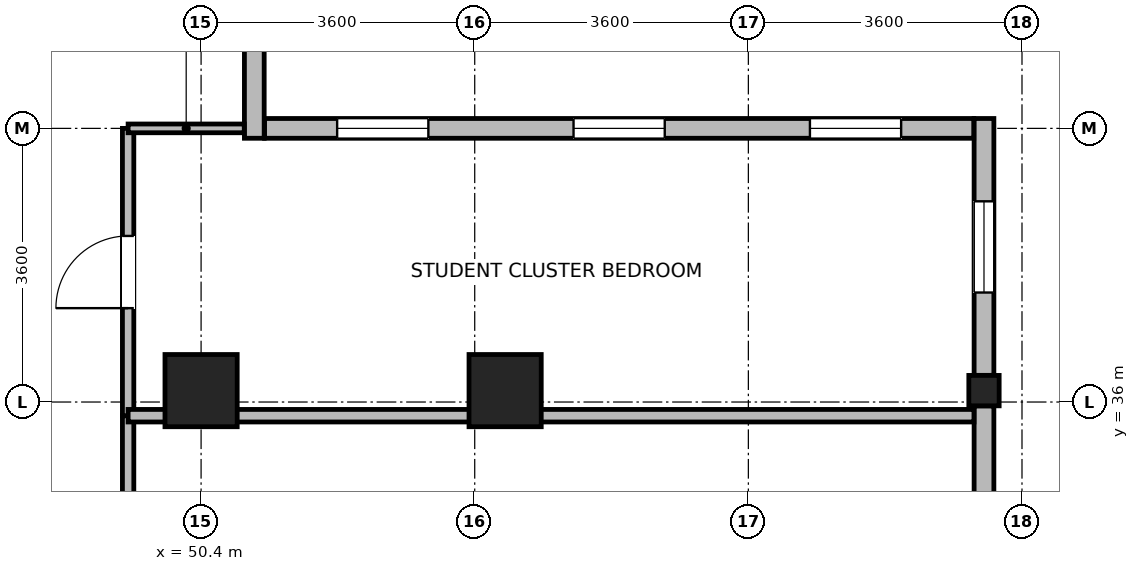
"""IFC4 building model, lengths in metres.
Left out: names, types, materials, properties, quantities, classifications, styles, units other than length and angle.
Written with IfcOpenShell. Run it as: python <this file> out.ifc"""

import sys

from ifc_helpers import new_model, si_unit, direction, frame, frame_2d, origin, origin_2d, place, context, subcontext, project, spatial, rectangle, i_section, extrude, source, transform, mapped, element, fill, save


model = new_model("IFC4")
c1 = context("Model", 3, precision=1e-05, world=origin(), true_north=direction((0.0, 1.0)))
c2 = subcontext(c1, "Body", "Model", "MODEL_VIEW")
j1 = project(units=[si_unit("LENGTHUNIT", "METRE"), si_unit("PLANEANGLEUNIT", "RADIAN")], contexts=[c1])
p1 = place(None, origin())
s1 = spatial("IfcSite", under=j1, at=p1, CompositionType="ELEMENT")
p2 = place(p1, origin())
s2 = spatial("IfcBuilding", under=s1, at=p2, CompositionType="ELEMENT")
p3 = place(p2, frame((0.0, 0.0, 242.5)))
s3 = spatial("IfcBuildingStorey", under=s2, at=p3, CompositionType="ELEMENT", Elevation=242.5)
m1 = source(origin(), c2, "Body", "SweptSolid", [
    extrude(rectangle(XDim=0.95, YDim=0.95, at=origin_2d()), origin(), (0.0, 0.0, 1.0), 3.7),
])
for number, where, z_axis, x_axis in (
    (1, (50.4, 36.15, 0.0), (0.0, 0.0, 1.0), (1.0, 0.0, 0.0)),
    (2, (54.4, 36.15, 0.0), (0.0, 0.0, 1.0), (1.0, 0.0, 0.0)),
):
    element("IfcColumn", number, at=place(p3, frame(where, z_axis=z_axis, x_axis=x_axis)), inside=s3, PredefinedType="COLUMN", context=c2, shape_type="MappedRepresentation", body=[
        mapped(m1, transform((0.0, 0.0, 0.0), x_axis=(1.0, 0.0, 0.0), y_axis=(0.0, 1.0, 0.0), z_axis=(0.0, 0.0, 1.0), scale=1.0)),
    ])
m2 = source(origin(), c2, "Body", "SweptSolid", [
    extrude(i_section(OverallWidth=0.399, OverallDepth=0.4, WebThickness=0.017, FlangeThickness=0.023, FilletRadius=0.015, at=origin_2d()), origin(), (0.0, 0.0, 1.0), 3.7),
])
p4 = place(p3, frame((60.7, 36.15, 0.0), z_axis=(0.0, 0.0, 1.0), x_axis=(1.0, 0.0, 0.0)))
e3 = element("IfcColumn", 3, at=p4, inside=s3, PredefinedType="COLUMN", context=c2, shape_type="MappedRepresentation", body=[
    mapped(m2, transform((0.0, 0.0, 0.0), x_axis=(1.0, 0.0, 0.0), y_axis=(0.0, 1.0, 0.0), z_axis=(0.0, 0.0, 1.0), scale=1.0)),
])
p5 = place(p3, frame((60.7, 35.949, 0.0), z_axis=(0.0, 0.0, 1.0), x_axis=(0.0, -1.0, 0.0)))
e4 = element("IfcWall", 4, at=p5, inside=s3, PredefinedType="STANDARD", context=c2, shape_type="SweptSolid", body=[
    extrude(rectangle(XDim=7.098, YDim=0.26, at=frame_2d((3.549, 0.0))), origin(), (0.0, 0.0, 1.0), 3.02),
])
p6 = place(p5, frame((1.175, 0.0, 0.85)))
e5 = element("IfcOpeningElement", 5, at=p6, cuts=e4, PredefinedType="OPENING", context=c2, shape_type="SweptSolid", body=[
    extrude(rectangle(XDim=1.2, YDim=1.75, at=frame_2d((0.6, 0.875))), frame((0.0, 0.14, 0.0), z_axis=(0.0, -1.0, 0.0), x_axis=(1.0, 0.0, 0.0)), (0.0, 0.0, 1.0), 0.28),
])
p7 = place(p5, frame((4.723, 0.0, 0.85)))
e6 = element("IfcOpeningElement", 6, at=p7, cuts=e4, PredefinedType="OPENING", context=c2, shape_type="SweptSolid", body=[
    extrude(rectangle(XDim=1.2, YDim=1.75, at=frame_2d((0.6, 0.875))), frame((0.0, 0.14, 0.0), z_axis=(0.0, -1.0, 0.0), x_axis=(1.0, 0.0, 0.0)), (0.0, 0.0, 1.0), 0.28),
])
p8 = place(p3, frame((60.7, 39.73, 0.0), z_axis=(0.0, 0.0, 1.0), x_axis=(0.0, -1.0, 0.0)))
e7 = element("IfcWall", 7, at=p8, inside=s3, PredefinedType="STANDARD", context=c2, shape_type="SweptSolid", body=[
    extrude(rectangle(XDim=3.379, YDim=0.26, at=frame_2d((1.689, 0.0))), origin(), (0.0, 0.0, 1.0), 3.42),
])
p9 = place(p8, frame((1.09, 0.0, 0.85)))
e8 = element("IfcOpeningElement", 8, at=p9, cuts=e7, PredefinedType="OPENING", context=c2, shape_type="SweptSolid", body=[
    extrude(rectangle(XDim=1.2, YDim=1.75, at=frame_2d((0.6, 0.875))), frame((0.0, 0.14, 0.0), z_axis=(0.0, -1.0, 0.0), x_axis=(1.0, 0.0, 0.0)), (0.0, 0.0, 1.0), 0.28),
])
p10 = place(p3, frame((51.235, 39.6, 0.0), z_axis=(0.0, 0.0, 1.0), x_axis=(1.0, 0.0, 0.0)))
e9 = element("IfcWall", 9, at=p10, inside=s3, PredefinedType="STANDARD", context=c2, shape_type="SweptSolid", body=[
    extrude(rectangle(XDim=9.33, YDim=0.26, at=frame_2d((4.665, 0.0))), origin(), (0.0, 0.0, 1.0), 3.42),
])
p11 = place(p10, frame((0.955, 0.0, 0.85)))
e10 = element("IfcOpeningElement", 10, at=p11, cuts=e9, PredefinedType="OPENING", context=c2, shape_type="SweptSolid", body=[
    extrude(rectangle(XDim=1.2, YDim=1.75, at=frame_2d((0.6, 0.875))), frame((0.0, 0.14, 0.0), z_axis=(0.0, -1.0, 0.0), x_axis=(1.0, 0.0, 0.0)), (0.0, 0.0, 1.0), 0.28),
])
p12 = place(p10, frame((4.065, 0.0, 0.85)))
e11 = element("IfcOpeningElement", 11, at=p12, cuts=e9, PredefinedType="OPENING", context=c2, shape_type="SweptSolid", body=[
    extrude(rectangle(XDim=1.2, YDim=1.75, at=frame_2d((0.6, 0.875))), frame((0.0, 0.14, 0.0), z_axis=(0.0, -1.0, 0.0), x_axis=(1.0, 0.0, 0.0)), (0.0, 0.0, 1.0), 0.28),
])
p13 = place(p10, frame((7.175, 0.0, 0.85)))
e12 = element("IfcOpeningElement", 12, at=p13, cuts=e9, PredefinedType="OPENING", context=c2, shape_type="SweptSolid", body=[
    extrude(rectangle(XDim=1.2, YDim=1.75, at=frame_2d((0.6, 0.875))), frame((0.0, 0.14, 0.0), z_axis=(0.0, -1.0, 0.0), x_axis=(1.0, 0.0, 0.0)), (0.0, 0.0, 1.0), 0.28),
])
p14 = place(p3, frame((51.1, 43.33, 0.0), z_axis=(0.0, 0.0, 1.0), x_axis=(0.0, -1.0, 0.0)))
e13 = element("IfcWall", 13, at=p14, inside=s3, PredefinedType="STANDARD", context=c2, shape_type="SweptSolid", body=[
    extrude(rectangle(XDim=3.86, YDim=0.26, at=frame_2d((1.93, 0.0))), origin(), (0.0, 0.0, 1.0), 3.42),
])
p15 = place(p14, frame((1.33, 0.0, 0.85)))
e14 = element("IfcOpeningElement", 14, at=p15, cuts=e13, PredefinedType="OPENING", context=c2, shape_type="SweptSolid", body=[
    extrude(rectangle(XDim=1.2, YDim=1.75, at=frame_2d((0.6, 0.875))), frame((0.0, 0.14, 0.0), z_axis=(0.0, -1.0, 0.0), x_axis=(1.0, 0.0, 0.0)), (0.0, 0.0, 1.0), 0.28),
])
p16 = place(p3, frame((49.44, 32.04, 0.0), z_axis=(0.0, 0.0, 1.0), x_axis=(0.0, 1.0, 0.0)))
e15 = element("IfcWall", 15, at=p16, inside=s3, PredefinedType="PARTITIONING", context=c2, shape_type="SweptSolid", body=[
    extrude(rectangle(XDim=3.78, YDim=0.15, at=frame_2d((1.89, 0.0))), origin(), (0.0, 0.0, 1.0), 3.42),
])
p17 = place(p16, frame((1.415, 0.0, 0.0)))
e16 = element("IfcOpeningElement", 16, at=p17, cuts=e15, PredefinedType="OPENING", context=c2, shape_type="SweptSolid", body=[
    extrude(rectangle(XDim=0.95, YDim=2.1, at=frame_2d((0.475, 1.05))), frame((0.0, 0.085, 0.0), z_axis=(0.0, -1.0, 0.0), x_axis=(1.0, 0.0, 0.0)), (0.0, 0.0, 1.0), 0.17),
])
p18 = place(p3, frame((49.44, 35.82, 0.0), z_axis=(0.0, 0.0, 1.0), x_axis=(0.0, 1.0, 0.0)))
e17 = element("IfcWall", 17, at=p18, inside=s3, PredefinedType="PARTITIONING", context=c2, shape_type="SweptSolid", body=[
    extrude(rectangle(XDim=3.78, YDim=0.15, at=frame_2d((1.89, 0.0))), origin(), (0.0, 0.0, 1.0), 3.42),
])
p19 = place(p18, frame((1.415, 0.0, 0.0)))
e18 = element("IfcOpeningElement", 18, at=p19, cuts=e17, PredefinedType="OPENING", context=c2, shape_type="SweptSolid", body=[
    extrude(rectangle(XDim=0.95, YDim=2.1, at=frame_2d((0.475, 1.05))), frame((0.0, 0.085, 0.0), z_axis=(0.0, -1.0, 0.0), x_axis=(1.0, 0.0, 0.0)), (0.0, 0.0, 1.0), 0.17),
])
p20 = place(p3, frame((49.44, 35.82, 0.0), z_axis=(0.0, 0.0, 1.0), x_axis=(1.0, 0.0, 0.0)))
e19 = element("IfcWall", 19, at=p20, inside=s3, PredefinedType="PARTITIONING", context=c2, shape_type="SweptSolid", body=[
    extrude(rectangle(XDim=11.128, YDim=0.165, at=frame_2d((5.564, 0.0))), origin(), (0.0, 0.0, 1.0), 3.42),
])
p21 = place(p3, frame((49.44, 39.6, 0.0), z_axis=(0.0, 0.0, 1.0), x_axis=(1.0, 0.0, 0.0)))
e20 = element("IfcWall", 20, at=p21, inside=s3, PredefinedType="PARTITIONING", context=c2, shape_type="SweptSolid", body=[
    extrude(rectangle(XDim=1.528, YDim=0.115, at=frame_2d((0.764, 0.0))), origin(), (0.0, 0.0, 1.0), 3.42),
])
p22 = place(p9, origin())
e21 = element("IfcWindow", 21, at=p22, inside=s3, PartitioningType="SINGLE_PANEL", PredefinedType="WINDOW", context=c2, shape_type="SweptSolid", body=[
    extrude(rectangle(XDim=1.2, YDim=1.75, at=frame_2d((0.6, 0.875))), frame((0.0, 0.03, 0.0), z_axis=(0.0, -1.0, 0.0), x_axis=(1.0, 0.0, 0.0)), (0.0, 0.0, 1.0), 0.06),
])
fill(e8, e21)
p23 = place(p11, origin())
e22 = element("IfcWindow", 22, at=p23, inside=s3, PartitioningType="SINGLE_PANEL", PredefinedType="WINDOW", context=c2, shape_type="SweptSolid", body=[
    extrude(rectangle(XDim=1.2, YDim=1.75, at=frame_2d((0.6, 0.875))), frame((0.0, 0.03, 0.0), z_axis=(0.0, -1.0, 0.0), x_axis=(1.0, 0.0, 0.0)), (0.0, 0.0, 1.0), 0.06),
])
fill(e10, e22)
p24 = place(p12, origin())
e23 = element("IfcWindow", 23, at=p24, inside=s3, PartitioningType="SINGLE_PANEL", PredefinedType="WINDOW", context=c2, shape_type="SweptSolid", body=[
    extrude(rectangle(XDim=1.2, YDim=1.75, at=frame_2d((0.6, 0.875))), frame((0.0, 0.03, 0.0), z_axis=(0.0, -1.0, 0.0), x_axis=(1.0, 0.0, 0.0)), (0.0, 0.0, 1.0), 0.06),
])
fill(e11, e23)
p25 = place(p13, origin())
e24 = element("IfcWindow", 24, at=p25, inside=s3, PartitioningType="SINGLE_PANEL", PredefinedType="WINDOW", context=c2, shape_type="SweptSolid", body=[
    extrude(rectangle(XDim=1.2, YDim=1.75, at=frame_2d((0.6, 0.875))), frame((0.0, 0.03, 0.0), z_axis=(0.0, -1.0, 0.0), x_axis=(1.0, 0.0, 0.0)), (0.0, 0.0, 1.0), 0.06),
])
fill(e12, e24)
p26 = place(p19, origin())
e25 = element("IfcDoor", 25, at=p26, inside=s3, OperationType="SINGLE_SWING_LEFT", PredefinedType="DOOR", context=c2, shape_type="SweptSolid", body=[
    extrude(rectangle(XDim=0.95, YDim=2.1, at=frame_2d((0.475, 1.05))), frame((0.0, 0.025, 0.0), z_axis=(0.0, -1.0, 0.0), x_axis=(1.0, 0.0, 0.0)), (0.0, 0.0, 1.0), 0.05),
])
fill(e18, e25)
save(model, sys.argv[1])
